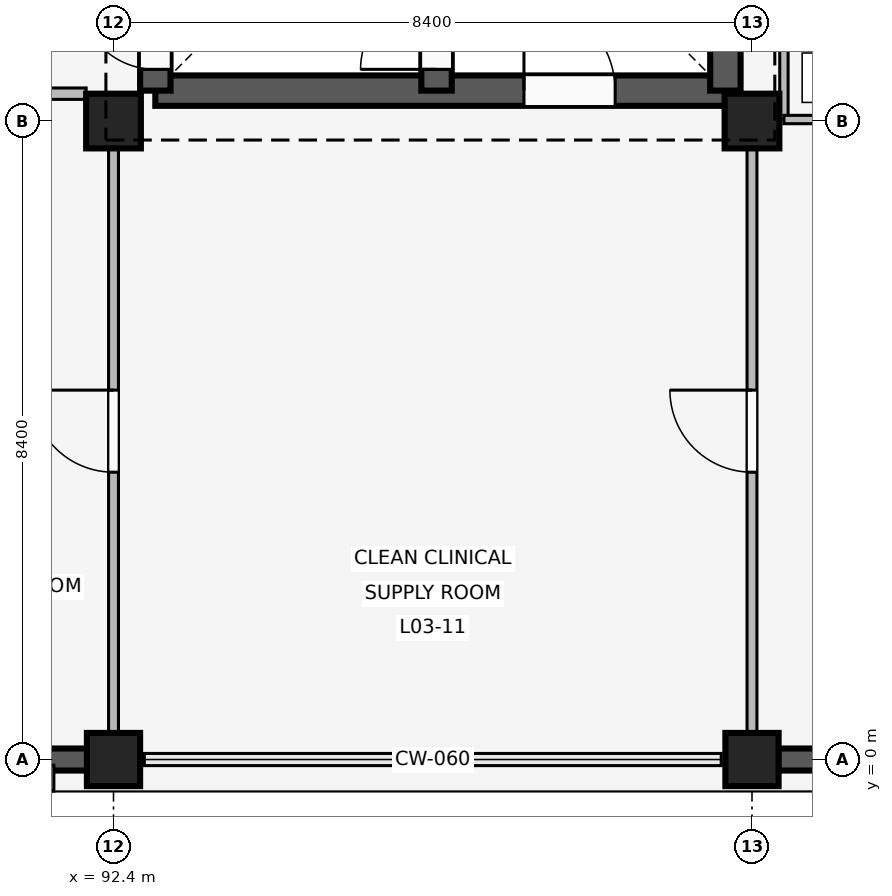
"""IFC4 building model, lengths in metres.
Left out: names, types, materials, properties, quantities, classifications, styles, units other than length and angle.
Written with IfcOpenShell. Run it as: python <this file> out.ifc"""

import sys

from ifc_helpers import new_model, si_unit, direction, frame, frame_2d, origin, origin_2d, place, context, subcontext, project, spatial, rectangle, extrude, element, fill, save


model = new_model("IFC4")
c1 = context("Model", 3, precision=1e-05, world=origin(), true_north=direction((0.0, 1.0)))
c2 = subcontext(c1, "Body", "Model", "MODEL_VIEW")
j1 = project(units=[si_unit("LENGTHUNIT", "METRE"), si_unit("PLANEANGLEUNIT", "RADIAN")], contexts=[c1])
p1 = place(None, origin())
s1 = spatial("IfcSite", under=j1, at=p1, CompositionType="ELEMENT")
p2 = place(p1, origin())
s2 = spatial("IfcBuilding", under=s1, at=p2, CompositionType="ELEMENT")
p3 = place(p2, frame((0.0, 0.0, 12.9)))
s3 = spatial("IfcBuildingStorey", under=s2, at=p3, CompositionType="ELEMENT", Elevation=12.9)
p4 = place(p3, frame((92.4, 0.0, 0.0), z_axis=(0.0, 0.0, 1.0), x_axis=(1.0, 0.0, 0.0)))
e1 = element("IfcColumn", 1, at=p4, inside=s3, PredefinedType="COLUMN", context=c2, shape_type="SweptSolid", body=[
    extrude(rectangle(XDim=0.7, YDim=0.7, at=origin_2d()), origin(), (0.0, 0.0, 1.0), 3.3),
])
p5 = place(p3, frame((92.4, 8.4, 0.0), z_axis=(0.0, 0.0, 1.0), x_axis=(1.0, 0.0, 0.0)))
e2 = element("IfcColumn", 2, at=p5, inside=s3, PredefinedType="COLUMN", context=c2, shape_type="SweptSolid", body=[
    extrude(rectangle(XDim=0.72, YDim=0.72, at=origin_2d()), origin(), (0.0, 0.0, 1.0), 3.3),
])
p6 = place(p3, frame((100.8, 0.0, 0.0), z_axis=(0.0, 0.0, 1.0), x_axis=(1.0, 0.0, 0.0)))
e3 = element("IfcColumn", 3, at=p6, inside=s3, PredefinedType="COLUMN", context=c2, shape_type="SweptSolid", body=[
    extrude(rectangle(XDim=0.7, YDim=0.7, at=origin_2d()), origin(), (0.0, 0.0, 1.0), 3.3),
])
p7 = place(p3, frame((100.8, 8.4, 0.0), z_axis=(0.0, 0.0, 1.0), x_axis=(1.0, 0.0, 0.0)))
e4 = element("IfcColumn", 4, at=p7, inside=s3, PredefinedType="COLUMN", context=c2, shape_type="SweptSolid", body=[
    extrude(rectangle(XDim=0.72, YDim=0.72, at=origin_2d()), origin(), (0.0, 0.0, 1.0), 3.3),
])
p8 = place(p3, frame((92.055, 0.0, 0.0), z_axis=(0.0, 0.0, 1.0), x_axis=(-1.0, 0.0, 0.0)))
e5 = element("IfcWall", 5, at=p8, inside=s3, PredefinedType="SOLIDWALL", context=c2, shape_type="SweptSolid", body=[
    extrude(rectangle(XDim=7.71, YDim=0.29, at=frame_2d((3.855, 0.0))), origin(), (0.0, 0.0, 1.0), 2.44),
])
p9 = place(p8, frame((5.127, 0.0, 0.85)))
e6 = element("IfcOpeningElement", 6, at=p9, cuts=e5, PredefinedType="OPENING", context=c2, shape_type="SweptSolid", body=[
    extrude(rectangle(XDim=1.62, YDim=0.95, at=frame_2d((0.81, 0.475))), frame((0.0, 0.155, 0.0), z_axis=(0.0, -1.0, 0.0), x_axis=(1.0, 0.0, 0.0)), (0.0, 0.0, 1.0), 0.31),
])
p10 = place(p3, frame((91.515, -0.075, 0.0), z_axis=(0.0, 0.0, 1.0), x_axis=(0.0, -1.0, 0.0)))
e7 = element("IfcWall", 7, at=p10, inside=s3, PredefinedType="ELEMENTEDWALL", context=c2, shape_type="SweptSolid", body=[
    extrude(rectangle(XDim=0.34, YDim=0.2, at=frame_2d((0.17, 0.0))), origin(), (0.0, 0.0, 1.0), 2.42),
])
p11 = place(p3, frame((108.855, 0.0, 0.0), z_axis=(0.0, 0.0, 1.0), x_axis=(-1.0, 0.0, 0.0)))
e8 = element("IfcWall", 8, at=p11, inside=s3, PredefinedType="SOLIDWALL", context=c2, shape_type="SweptSolid", body=[
    extrude(rectangle(XDim=7.71, YDim=0.29, at=frame_2d((3.855, 0.0))), origin(), (0.0, 0.0, 1.0), 2.44),
])
p12 = place(p11, frame((0.963, 0.0, 0.85)))
e9 = element("IfcOpeningElement", 9, at=p12, cuts=e8, PredefinedType="OPENING", context=c2, shape_type="SweptSolid", body=[
    extrude(rectangle(XDim=1.62, YDim=0.95, at=frame_2d((0.81, 0.475))), frame((0.0, 0.155, 0.0), z_axis=(0.0, -1.0, 0.0), x_axis=(1.0, 0.0, 0.0)), (0.0, 0.0, 1.0), 0.31),
])
p13 = place(p11, frame((5.127, 0.0, 0.85)))
e10 = element("IfcOpeningElement", 10, at=p13, cuts=e8, PredefinedType="OPENING", context=c2, shape_type="SweptSolid", body=[
    extrude(rectangle(XDim=1.62, YDim=0.95, at=frame_2d((0.81, 0.475))), frame((0.0, 0.155, 0.0), z_axis=(0.0, -1.0, 0.0), x_axis=(1.0, 0.0, 0.0)), (0.0, 0.0, 1.0), 0.31),
])
p14 = place(p3, frame((92.95, 8.8, 0.0), z_axis=(0.0, 0.0, 1.0), x_axis=(1.0, 0.0, 0.0)))
e11 = element("IfcWall", 11, at=p14, inside=s3, PredefinedType="SHEAR", context=c2, shape_type="SweptSolid", body=[
    extrude(rectangle(XDim=7.5, YDim=0.4, at=frame_2d((3.75, 0.0))), origin(), (0.0, 0.0, 1.0), 3.02),
])
p15 = place(p14, frame((4.85, 0.0, 0.0)))
e12 = element("IfcOpeningElement", 12, at=p15, cuts=e11, PredefinedType="OPENING", context=c2, shape_type="SweptSolid", body=[
    extrude(rectangle(XDim=1.2, YDim=2.2, at=frame_2d((0.6, 1.1))), frame((0.0, 0.21, 0.0), z_axis=(0.0, -1.0, 0.0), x_axis=(1.0, 0.0, 0.0)), (0.0, 0.0, 1.0), 0.42),
])
p16 = place(p3, frame((92.95, 8.8, 0.0), z_axis=(0.0, 0.0, 1.0), x_axis=(0.0, 1.0, 0.0)))
e13 = element("IfcWall", 13, at=p16, inside=s3, PredefinedType="SHEAR", context=c2, shape_type="SweptSolid", body=[
    extrude(rectangle(XDim=7.55, YDim=0.4, at=frame_2d((3.775, 0.0))), origin(), (0.0, 0.0, 1.0), 3.02),
])
p17 = place(p16, frame((0.28, 0.0, 0.0)))
e14 = element("IfcOpeningElement", 14, at=p17, cuts=e13, PredefinedType="OPENING", context=c2, shape_type="SweptSolid", body=[
    extrude(rectangle(XDim=1.0, YDim=2.15, at=frame_2d((0.5, 1.075))), frame((0.0, 0.21, 0.0), z_axis=(0.0, -1.0, 0.0), x_axis=(1.0, 0.0, 0.0)), (0.0, 0.0, 1.0), 0.42),
])
p18 = place(p3, frame((100.45, 8.8, 0.0), z_axis=(0.0, 0.0, 1.0), x_axis=(0.0, 1.0, 0.0)))
e15 = element("IfcWall", 15, at=p18, inside=s3, PredefinedType="SHEAR", context=c2, shape_type="SweptSolid", body=[
    extrude(rectangle(XDim=7.55, YDim=0.4, at=frame_2d((3.775, 0.0))), origin(), (0.0, 0.0, 1.0), 3.02),
])
p19 = place(p18, frame((2.4, 0.0, 0.0)))
e16 = element("IfcOpeningElement", 16, at=p19, cuts=e15, PredefinedType="OPENING", context=c2, shape_type="SweptSolid", body=[
    extrude(rectangle(XDim=1.2, YDim=2.2, at=frame_2d((0.6, 1.1))), frame((0.0, 0.21, 0.0), z_axis=(0.0, -1.0, 0.0), x_axis=(1.0, 0.0, 0.0)), (0.0, 0.0, 1.0), 0.42),
])
p20 = place(p3, frame((96.65, 8.8, 0.0), z_axis=(0.0, 0.0, 1.0), x_axis=(0.0, 1.0, 0.0)))
e17 = element("IfcWall", 17, at=p20, inside=s3, PredefinedType="SHEAR", context=c2, shape_type="SweptSolid", body=[
    extrude(rectangle(XDim=7.55, YDim=0.4, at=frame_2d((3.775, 0.0))), origin(), (0.0, 0.0, 1.0), 3.02),
])
p21 = place(p20, frame((0.28, 0.0, 0.0)))
e18 = element("IfcOpeningElement", 18, at=p21, cuts=e17, PredefinedType="OPENING", context=c2, shape_type="SweptSolid", body=[
    extrude(rectangle(XDim=1.0, YDim=2.15, at=frame_2d((0.5, 1.075))), frame((0.0, 0.21, 0.0), z_axis=(0.0, -1.0, 0.0), x_axis=(1.0, 0.0, 0.0)), (0.0, 0.0, 1.0), 0.42),
])
p22 = place(p3, frame((89.86, 8.76, 0.0), z_axis=(0.0, 0.0, 1.0), x_axis=(1.0, 0.0, 0.0)))
e19 = element("IfcWall", 19, at=p22, inside=s3, PredefinedType="PARTITIONING", context=c2, shape_type="SweptSolid", body=[
    extrude(rectangle(XDim=2.18, YDim=0.15, at=frame_2d((1.09, 0.0))), origin(), (0.0, 0.0, 1.0), 2.42),
])
p23 = place(p22, frame((0.5, 0.0, 0.0)))
e20 = element("IfcOpeningElement", 20, at=p23, cuts=e19, PredefinedType="OPENING", context=c2, shape_type="SweptSolid", body=[
    extrude(rectangle(XDim=1.08, YDim=2.15, at=frame_2d((0.54, 1.075))), frame((0.0, 0.085, 0.0), z_axis=(0.0, -1.0, 0.0), x_axis=(1.0, 0.0, 0.0)), (0.0, 0.0, 1.0), 0.17),
])
p24 = place(p3, frame((92.4, 0.14, 0.0), z_axis=(0.0, 0.0, 1.0), x_axis=(0.0, 1.0, 0.0)))
e21 = element("IfcWall", 21, at=p24, inside=s3, PredefinedType="PARTITIONING", context=c2, shape_type="SweptSolid", body=[
    extrude(rectangle(XDim=8.21, YDim=0.13, at=frame_2d((4.105, 0.0))), origin(), (0.0, 0.0, 1.0), 2.42),
])
p25 = place(p24, frame((3.64, 0.0, 0.0)))
e22 = element("IfcOpeningElement", 22, at=p25, cuts=e21, PredefinedType="OPENING", context=c2, shape_type="SweptSolid", body=[
    extrude(rectangle(XDim=1.08, YDim=2.15, at=frame_2d((0.54, 1.075))), frame((0.0, 0.075, 0.0), z_axis=(0.0, -1.0, 0.0), x_axis=(1.0, 0.0, 0.0)), (0.0, 0.0, 1.0), 0.15),
])
p26 = place(p3, frame((100.8, 0.14, 0.0), z_axis=(0.0, 0.0, 1.0), x_axis=(0.0, 1.0, 0.0)))
e23 = element("IfcWall", 23, at=p26, inside=s3, PredefinedType="PARTITIONING", context=c2, shape_type="SweptSolid", body=[
    extrude(rectangle(XDim=8.21, YDim=0.13, at=frame_2d((4.105, 0.0))), origin(), (0.0, 0.0, 1.0), 2.42),
])
p27 = place(p26, frame((3.64, 0.0, 0.0)))
e24 = element("IfcOpeningElement", 24, at=p27, cuts=e23, PredefinedType="OPENING", context=c2, shape_type="SweptSolid", body=[
    extrude(rectangle(XDim=1.08, YDim=2.15, at=frame_2d((0.54, 1.075))), frame((0.0, 0.075, 0.0), z_axis=(0.0, -1.0, 0.0), x_axis=(1.0, 0.0, 0.0)), (0.0, 0.0, 1.0), 0.15),
])
p28 = place(p3, frame((101.22, 8.42, 0.0), z_axis=(0.0, 0.0, 1.0), x_axis=(0.0, 1.0, 0.0)))
e25 = element("IfcWall", 25, at=p28, inside=s3, PredefinedType="PARTITIONING", context=c2, shape_type="SweptSolid", body=[
    extrude(rectangle(XDim=2.61, YDim=0.11, at=frame_2d((1.305, 0.0))), origin(), (0.0, 0.0, 1.0), 2.42),
])
p29 = place(p3, frame((101.22, 8.42, 0.0), z_axis=(0.0, 0.0, 1.0), x_axis=(1.0, 0.0, 0.0)))
e26 = element("IfcWall", 26, at=p29, inside=s3, PredefinedType="PARTITIONING", context=c2, shape_type="SweptSolid", body=[
    extrude(rectangle(XDim=1.98, YDim=0.11, at=frame_2d((0.99, 0.0))), origin(), (0.0, 0.0, 1.0), 2.42),
])
p30 = place(p29, frame((0.54, 0.0, 0.0)))
e27 = element("IfcOpeningElement", 27, at=p30, cuts=e26, PredefinedType="OPENING", context=c2, shape_type="SweptSolid", body=[
    extrude(rectangle(XDim=0.9, YDim=2.1, at=frame_2d((0.45, 1.05))), frame((0.0, 0.065, 0.0), z_axis=(0.0, -1.0, 0.0), x_axis=(1.0, 0.0, 0.0)), (0.0, 0.0, 1.0), 0.13),
])
p31 = place(p15, origin())
e28 = element("IfcDoor", 28, at=p31, inside=s3, OperationType="SINGLE_SWING_LEFT", PredefinedType="DOOR", context=c2, shape_type="SweptSolid", body=[
    extrude(rectangle(XDim=1.2, YDim=2.2, at=frame_2d((0.6, 1.1))), frame((0.0, 0.025, 0.0), z_axis=(0.0, -1.0, 0.0), x_axis=(1.0, 0.0, 0.0)), (0.0, 0.0, 1.0), 0.05),
])
fill(e12, e28)
p32 = place(p17, origin())
e29 = element("IfcDoor", 29, at=p32, inside=s3, OperationType="SINGLE_SWING_RIGHT", PredefinedType="DOOR", context=c2, shape_type="SweptSolid", body=[
    extrude(rectangle(XDim=1.0, YDim=2.15, at=frame_2d((0.5, 1.075))), frame((0.0, 0.025, 0.0), z_axis=(0.0, -1.0, 0.0), x_axis=(1.0, 0.0, 0.0)), (0.0, 0.0, 1.0), 0.05),
])
fill(e14, e29)
p33 = place(p21, origin())
e30 = element("IfcDoor", 30, at=p33, inside=s3, OperationType="SINGLE_SWING_LEFT", PredefinedType="DOOR", context=c2, shape_type="SweptSolid", body=[
    extrude(rectangle(XDim=1.0, YDim=2.15, at=frame_2d((0.5, 1.075))), frame((0.0, 0.025, 0.0), z_axis=(0.0, -1.0, 0.0), x_axis=(1.0, 0.0, 0.0)), (0.0, 0.0, 1.0), 0.05),
])
fill(e18, e30)
p34 = place(p25, origin())
e31 = element("IfcDoor", 31, at=p34, inside=s3, OperationType="SINGLE_SWING_RIGHT", PredefinedType="DOOR", context=c2, shape_type="SweptSolid", body=[
    extrude(rectangle(XDim=1.08, YDim=2.15, at=frame_2d((0.54, 1.075))), frame((0.0, 0.025, 0.0), z_axis=(0.0, -1.0, 0.0), x_axis=(1.0, 0.0, 0.0)), (0.0, 0.0, 1.0), 0.05),
])
fill(e22, e31)
p35 = place(p27, origin())
e32 = element("IfcDoor", 32, at=p35, inside=s3, OperationType="SINGLE_SWING_RIGHT", PredefinedType="DOOR", context=c2, shape_type="SweptSolid", body=[
    extrude(rectangle(XDim=1.08, YDim=2.15, at=frame_2d((0.54, 1.075))), frame((0.0, 0.025, 0.0), z_axis=(0.0, -1.0, 0.0), x_axis=(1.0, 0.0, 0.0)), (0.0, 0.0, 1.0), 0.05),
])
fill(e24, e32)
save(model, sys.argv[1])
